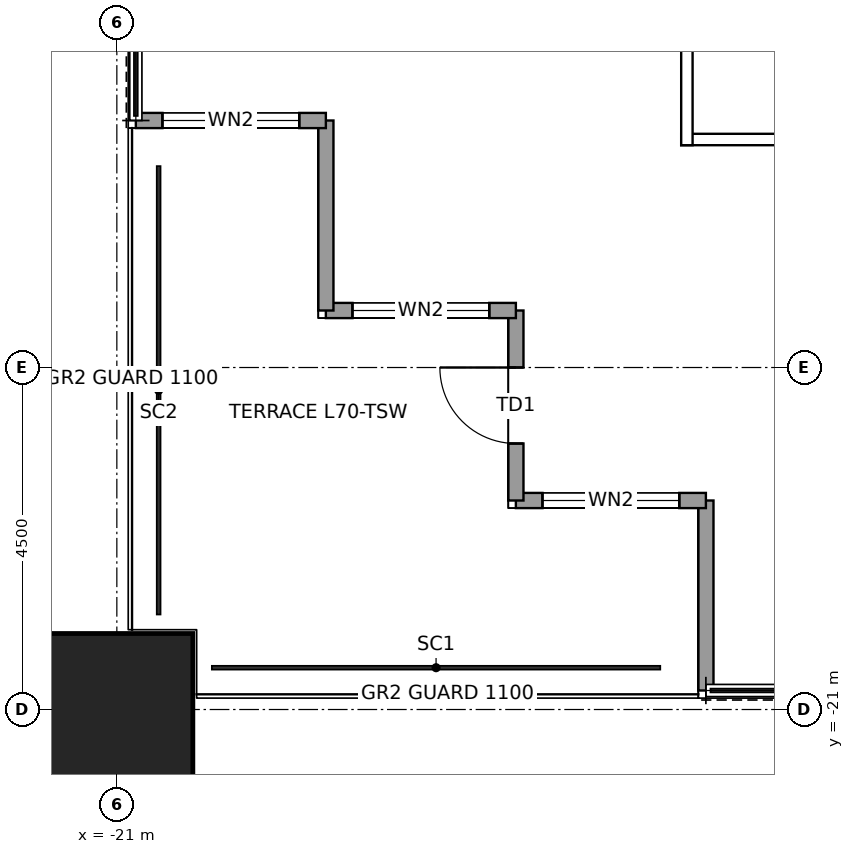
"""IFC4 building model, lengths in metres.
Left out: names, types, materials, properties, quantities, classifications, styles, units other than length and angle.
Written with IfcOpenShell. Run it as: python <this file> out.ifc"""

import sys

from ifc_helpers import new_model, si_unit, direction, frame, frame_2d, origin, origin_2d, place, context, subcontext, project, spatial, rectangle, hollow_rectangle, extrude, element, fill, save


model = new_model("IFC4")
c1 = context("Model", 3, precision=1e-05, world=origin(), true_north=direction((0.0, 1.0)))
c2 = subcontext(c1, "Body", "Model", "MODEL_VIEW")
j1 = project(units=[si_unit("LENGTHUNIT", "METRE"), si_unit("PLANEANGLEUNIT", "RADIAN")], contexts=[c1])
p1 = place(None, origin())
s1 = spatial("IfcSite", under=j1, at=p1, CompositionType="ELEMENT")
p2 = place(p1, origin())
s2 = spatial("IfcBuilding", under=s1, at=p2, CompositionType="ELEMENT")
p3 = place(p2, frame((0.0, 0.0, 315.9)))
s3 = spatial("IfcBuildingStorey", under=s2, at=p3, CompositionType="ELEMENT", Elevation=315.9)
p4 = place(p3, frame((-21.0, -21.0, 0.0), z_axis=(0.0, 0.0, 1.0), x_axis=(1.0, 0.0, 0.0)))
e1 = element("IfcColumn", 1, at=p4, inside=s3, PredefinedType="COLUMN", context=c2, shape_type="SweptSolid", body=[
    extrude(hollow_rectangle(XDim=2.0, YDim=2.0, WallThickness=0.095, at=origin_2d()), origin(), (0.0, 0.0, 1.0), 4.0),
])
p5 = place(p3, frame((-13.25, -20.75, 0.0), z_axis=(0.0, 0.0, 1.0), x_axis=(0.0, 1.0, 0.0)))
e2 = element("IfcWall", 2, at=p5, inside=s3, PredefinedType="SOLIDWALL", context=c2, shape_type="SweptSolid", body=[
    extrude(rectangle(XDim=2.5, YDim=0.2, at=frame_2d((1.25, 0.0))), origin(), (0.0, 0.0, 1.0), 3.85),
])
p6 = place(p3, frame((-13.25, -18.25, 0.0), z_axis=(0.0, 0.0, 1.0), x_axis=(-1.0, 0.0, 0.0)))
e3 = element("IfcWall", 3, at=p6, inside=s3, PredefinedType="SOLIDWALL", context=c2, shape_type="SweptSolid", body=[
    extrude(rectangle(XDim=2.5, YDim=0.2, at=frame_2d((1.25, 0.0))), origin(), (0.0, 0.0, 1.0), 3.85),
])
p7 = place(p6, frame((0.35, 0.0, 0.3)))
e4 = element("IfcOpeningElement", 4, at=p7, cuts=e3, PredefinedType="OPENING", context=c2, shape_type="SweptSolid", body=[
    extrude(rectangle(XDim=1.8, YDim=2.4, at=frame_2d((0.9, 1.2))), frame((0.0, 0.11, 0.0), z_axis=(0.0, -1.0, 0.0), x_axis=(1.0, 0.0, 0.0)), (0.0, 0.0, 1.0), 0.22),
])
p8 = place(p3, frame((-15.75, -18.25, 0.0), z_axis=(0.0, 0.0, 1.0), x_axis=(0.0, 1.0, 0.0)))
e5 = element("IfcWall", 5, at=p8, inside=s3, PredefinedType="SOLIDWALL", context=c2, shape_type="SweptSolid", body=[
    extrude(rectangle(XDim=2.5, YDim=0.2, at=frame_2d((1.25, 0.0))), origin(), (0.0, 0.0, 1.0), 3.317),
])
p9 = place(p8, frame((0.75, 0.0, 0.0)))
e6 = element("IfcOpeningElement", 6, at=p9, cuts=e5, PredefinedType="OPENING", context=c2, shape_type="SweptSolid", body=[
    extrude(rectangle(XDim=1.0, YDim=2.4, at=frame_2d((0.5, 1.2))), frame((0.0, 0.11, 0.0), z_axis=(0.0, -1.0, 0.0), x_axis=(1.0, 0.0, 0.0)), (0.0, 0.0, 1.0), 0.22),
])
p10 = place(p3, frame((-15.75, -15.75, 0.0), z_axis=(0.0, 0.0, 1.0), x_axis=(-1.0, 0.0, 0.0)))
e7 = element("IfcWall", 7, at=p10, inside=s3, PredefinedType="SOLIDWALL", context=c2, shape_type="SweptSolid", body=[
    extrude(rectangle(XDim=2.5, YDim=0.2, at=frame_2d((1.25, 0.0))), origin(), (0.0, 0.0, 1.0), 3.85),
])
p11 = place(p10, frame((0.35, 0.0, 0.3)))
e8 = element("IfcOpeningElement", 8, at=p11, cuts=e7, PredefinedType="OPENING", context=c2, shape_type="SweptSolid", body=[
    extrude(rectangle(XDim=1.8, YDim=2.4, at=frame_2d((0.9, 1.2))), frame((0.0, 0.11, 0.0), z_axis=(0.0, -1.0, 0.0), x_axis=(1.0, 0.0, 0.0)), (0.0, 0.0, 1.0), 0.22),
])
p12 = place(p3, frame((-18.25, -15.75, 0.0), z_axis=(0.0, 0.0, 1.0), x_axis=(0.0, 1.0, 0.0)))
e9 = element("IfcWall", 9, at=p12, inside=s3, PredefinedType="SOLIDWALL", context=c2, shape_type="SweptSolid", body=[
    extrude(rectangle(XDim=2.5, YDim=0.2, at=frame_2d((1.25, 0.0))), origin(), (0.0, 0.0, 1.0), 3.85),
])
p13 = place(p3, frame((-18.25, -13.25, 0.0), z_axis=(0.0, 0.0, 1.0), x_axis=(-1.0, 0.0, 0.0)))
e10 = element("IfcWall", 10, at=p13, inside=s3, PredefinedType="SOLIDWALL", context=c2, shape_type="SweptSolid", body=[
    extrude(rectangle(XDim=2.5, YDim=0.2, at=frame_2d((1.25, 0.0))), origin(), (0.0, 0.0, 1.0), 3.85),
])
p14 = place(p13, frame((0.35, 0.0, 0.3)))
e11 = element("IfcOpeningElement", 11, at=p14, cuts=e10, PredefinedType="OPENING", context=c2, shape_type="SweptSolid", body=[
    extrude(rectangle(XDim=1.8, YDim=2.4, at=frame_2d((0.9, 1.2))), frame((0.0, 0.11, 0.0), z_axis=(0.0, -1.0, 0.0), x_axis=(1.0, 0.0, 0.0)), (0.0, 0.0, 1.0), 0.22),
])
p15 = place(p3, frame((-13.575, -13.5, 0.0), z_axis=(0.0, 0.0, 1.0), x_axis=(1.0, 0.0, 0.0)))
e12 = element("IfcWall", 12, at=p15, inside=s3, PredefinedType="PARTITIONING", context=c2, shape_type="SweptSolid", body=[
    extrude(rectangle(XDim=13.65, YDim=0.15, at=frame_2d((6.825, 0.0))), origin(), (0.0, 0.0, 1.0), 3.85),
])
p16 = place(p15, frame((3.825, 0.0, 0.0)))
e13 = element("IfcOpeningElement", 13, at=p16, cuts=e12, PredefinedType="OPENING", context=c2, shape_type="SweptSolid", body=[
    extrude(rectangle(XDim=1.0, YDim=2.4, at=frame_2d((0.5, 1.2))), frame((0.0, 0.085, 0.0), z_axis=(0.0, -1.0, 0.0), x_axis=(1.0, 0.0, 0.0)), (0.0, 0.0, 1.0), 0.17),
])
p17 = place(p3, frame((-13.5, -13.575, 0.0), z_axis=(0.0, 0.0, 1.0), x_axis=(0.0, 1.0, 0.0)))
e14 = element("IfcWall", 14, at=p17, inside=s3, PredefinedType="PARTITIONING", context=c2, shape_type="SweptSolid", body=[
    extrude(rectangle(XDim=13.65, YDim=0.15, at=frame_2d((6.825, 0.0))), origin(), (0.0, 0.0, 1.0), 3.85),
])
p18 = place(p7, origin())
e15 = element("IfcWindow", 15, at=p18, inside=s3, PartitioningType="SINGLE_PANEL", PredefinedType="WINDOW", context=c2, shape_type="SweptSolid", body=[
    extrude(rectangle(XDim=1.8, YDim=2.4, at=frame_2d((0.9, 1.2))), frame((0.0, 0.03, 0.0), z_axis=(0.0, -1.0, 0.0), x_axis=(1.0, 0.0, 0.0)), (0.0, 0.0, 1.0), 0.06),
])
fill(e4, e15)
p19 = place(p9, origin())
e16 = element("IfcDoor", 16, at=p19, inside=s3, OperationType="SINGLE_SWING_RIGHT", PredefinedType="DOOR", context=c2, shape_type="SweptSolid", body=[
    extrude(rectangle(XDim=1.0, YDim=2.4, at=frame_2d((0.5, 1.2))), frame((0.0, 0.025, 0.0), z_axis=(0.0, -1.0, 0.0), x_axis=(1.0, 0.0, 0.0)), (0.0, 0.0, 1.0), 0.05),
])
fill(e6, e16)
p20 = place(p11, origin())
e17 = element("IfcWindow", 17, at=p20, inside=s3, PartitioningType="SINGLE_PANEL", PredefinedType="WINDOW", context=c2, shape_type="SweptSolid", body=[
    extrude(rectangle(XDim=1.8, YDim=2.4, at=frame_2d((0.9, 1.2))), frame((0.0, 0.03, 0.0), z_axis=(0.0, -1.0, 0.0), x_axis=(1.0, 0.0, 0.0)), (0.0, 0.0, 1.0), 0.06),
])
fill(e8, e17)
p21 = place(p14, origin())
e18 = element("IfcWindow", 18, at=p21, inside=s3, PartitioningType="SINGLE_PANEL", PredefinedType="WINDOW", context=c2, shape_type="SweptSolid", body=[
    extrude(rectangle(XDim=1.8, YDim=2.4, at=frame_2d((0.9, 1.2))), frame((0.0, 0.03, 0.0), z_axis=(0.0, -1.0, 0.0), x_axis=(1.0, 0.0, 0.0)), (0.0, 0.0, 1.0), 0.06),
])
fill(e11, e18)
save(model, sys.argv[1])
